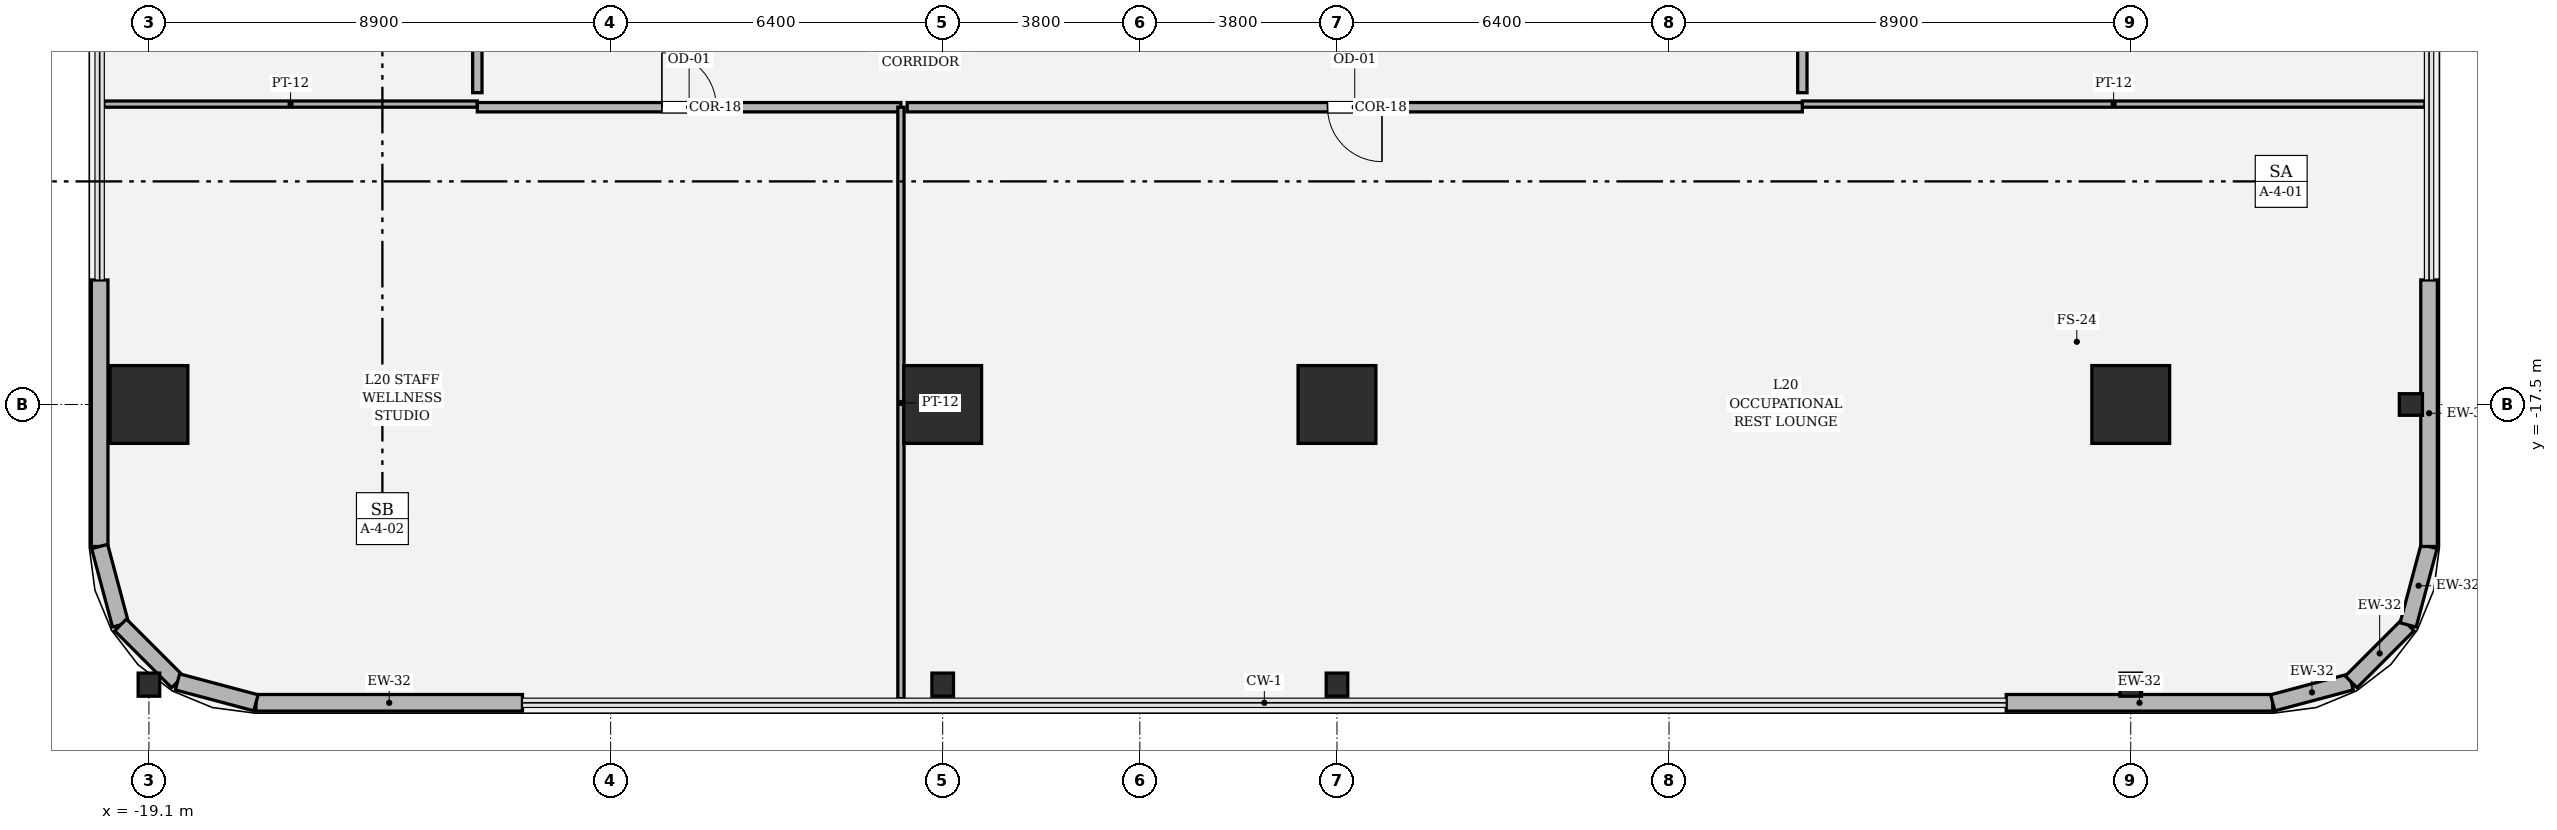
"""IFC4 building model, lengths in metres.
Left out: names, types, materials, properties, quantities, classifications, styles, units other than length and angle.
Written with IfcOpenShell. Run it as: python <this file> out.ifc"""

import sys

from ifc_helpers import new_model, si_unit, direction, frame, frame_2d, origin, origin_2d, place, context, subcontext, project, spatial, rectangle, hollow_rectangle, i_section, extrude, element, fill, save


model = new_model("IFC4")
c1 = context("Model", 3, precision=1e-05, world=origin(), true_north=direction((0.0, 1.0)))
c2 = subcontext(c1, "Body", "Model", "MODEL_VIEW")
j1 = project(units=[si_unit("LENGTHUNIT", "METRE"), si_unit("PLANEANGLEUNIT", "RADIAN")], contexts=[c1])
p1 = place(None, origin())
s1 = spatial("IfcSite", under=j1, at=p1, CompositionType="ELEMENT")
p2 = place(p1, origin())
s2 = spatial("IfcBuilding", under=s1, at=p2, CompositionType="ELEMENT")
p3 = place(p2, frame((0.0, 0.0, 88.95)))
s3 = spatial("IfcBuildingStorey", under=s2, at=p3, CompositionType="ELEMENT", Elevation=88.95)
for number, where, z_axis, x_axis in (
    (1, (-19.1, -17.5, 0.0), (0.0, 0.0, 1.0), (1.0, 0.0, 0.0)),
    (2, (-3.8, -17.5, 0.0), (0.0, 0.0, 1.0), (1.0, 0.0, 0.0)),
    (3, (3.8, -17.5, 0.0), (0.0, 0.0, 1.0), (1.0, 0.0, 0.0)),
    (4, (19.1, -17.5, 0.0), (0.0, 0.0, 1.0), (1.0, 0.0, 0.0)),
):
    element("IfcColumn", number, at=place(p3, frame(where, z_axis=z_axis, x_axis=x_axis)), inside=s3, PredefinedType="COLUMN", context=c2, shape_type="SweptSolid", body=[
        extrude(hollow_rectangle(XDim=1.5, YDim=1.5, WallThickness=0.045, at=origin_2d()), origin(), (0.0, 0.0, 1.0), 4.05),
    ])
for number, where, z_axis, x_axis in (
    (5, (-19.1, -22.9, 0.0), (0.0, 0.0, 1.0), (1.0, 0.0, 0.0)),
    (6, (-3.8, -22.9, 0.0), (0.0, 0.0, 1.0), (1.0, 0.0, 0.0)),
    (7, (3.8, -22.9, 0.0), (0.0, 0.0, 1.0), (1.0, 0.0, 0.0)),
    (8, (19.1, -22.9, 0.0), (0.0, 0.0, 1.0), (1.0, 0.0, 0.0)),
    (9, (24.5, -17.5, 0.0), (0.0, 0.0, 1.0), (0.0, 1.0, 0.0)),
):
    element("IfcColumn", number, at=place(p3, frame(where, z_axis=z_axis, x_axis=x_axis)), inside=s3, PredefinedType="COLUMN", context=c2, shape_type="SweptSolid", body=[
        extrude(i_section(OverallWidth=0.416, OverallDepth=0.446, WebThickness=0.039, FlangeThickness=0.062, FilletRadius=0.018, at=origin_2d()), origin(), (0.0, 0.0, 1.0), 4.048),
    ])
for number, where, z_axis, x_axis in (
    (10, (-17.037, -23.25, 0.0), (0.0, 0.0, 1.0), (1.0, 0.0, 0.0)),
    (11, (16.7, -23.25, 0.0), (0.0, 0.0, 1.0), (1.0, 0.0, 0.0)),
):
    element("IfcWall", number, at=place(p3, frame(where, z_axis=z_axis, x_axis=x_axis)), inside=s3, PredefinedType="SOLIDWALL", context=c2, shape_type="SweptSolid", body=[
        extrude(rectangle(XDim=5.137, YDim=0.32, at=frame_2d((2.568, 0.0))), origin(), (0.0, 0.0, 1.0), 3.77),
    ])
p4 = place(p3, frame((21.837, -23.25, 0.0), z_axis=(0.0, 0.0, 1.0), x_axis=(0.966224582397, 0.257701486942, 0.0)))
e12 = element("IfcWall", 12, at=p4, inside=s3, PredefinedType="SOLIDWALL", context=c2, shape_type="SweptSolid", body=[
    extrude(rectangle(XDim=1.565, YDim=0.32, at=frame_2d((0.783, 0.0))), origin(), (0.0, 0.0, 1.0), 3.77),
])
p5 = place(p3, frame((23.349, -22.847, 0.0), z_axis=(0.0, 0.0, 1.0), x_axis=(0.707028130747, 0.707185422879, 0.0)))
e13 = element("IfcWall", 13, at=p5, inside=s3, PredefinedType="SOLIDWALL", context=c2, shape_type="SweptSolid", body=[
    extrude(rectangle(XDim=1.552, YDim=0.32, at=frame_2d((0.776, 0.0))), origin(), (0.0, 0.0, 1.0), 3.77),
])
p6 = place(p3, frame((24.447, -21.749, 0.0), z_axis=(0.0, 0.0, 1.0), x_axis=(0.257847112249, 0.966185730957, 0.0)))
e14 = element("IfcWall", 14, at=p6, inside=s3, PredefinedType="SOLIDWALL", context=c2, shape_type="SweptSolid", body=[
    extrude(rectangle(XDim=1.565, YDim=0.32, at=frame_2d((0.783, 0.0))), origin(), (0.0, 0.0, 1.0), 3.77),
])
p7 = place(p3, frame((24.85, -20.237, 0.0), z_axis=(0.0, 0.0, 1.0), x_axis=(0.0, 1.0, 0.0)))
e15 = element("IfcWall", 15, at=p7, inside=s3, PredefinedType="SOLIDWALL", context=c2, shape_type="SweptSolid", body=[
    extrude(rectangle(XDim=5.137, YDim=0.32, at=frame_2d((2.568, 0.0))), origin(), (0.0, 0.0, 1.0), 2.444),
])
p8 = place(p3, frame((-20.05, -15.1, 0.0), z_axis=(0.0, 0.0, 1.0), x_axis=(0.0, -1.0, 0.0)))
e16 = element("IfcWall", 16, at=p8, inside=s3, PredefinedType="SOLIDWALL", context=c2, shape_type="SweptSolid", body=[
    extrude(rectangle(XDim=5.137, YDim=0.32, at=frame_2d((2.568, 0.0))), origin(), (0.0, 0.0, 1.0), 3.77),
])
p9 = place(p3, frame((-20.05, -20.237, 0.0), z_axis=(0.0, 0.0, 1.0), x_axis=(0.257847112249, -0.966185730957, 0.0)))
e17 = element("IfcWall", 17, at=p9, inside=s3, PredefinedType="SOLIDWALL", context=c2, shape_type="SweptSolid", body=[
    extrude(rectangle(XDim=1.565, YDim=0.32, at=frame_2d((0.783, 0.0))), origin(), (0.0, 0.0, 1.0), 3.77),
])
p10 = place(p3, frame((-19.646, -21.749, 0.0), z_axis=(0.0, 0.0, 1.0), x_axis=(0.707028130747, -0.707185422879, 0.0)))
e18 = element("IfcWall", 18, at=p10, inside=s3, PredefinedType="SOLIDWALL", context=c2, shape_type="SweptSolid", body=[
    extrude(rectangle(XDim=1.552, YDim=0.32, at=frame_2d((0.776, 0.0))), origin(), (0.0, 0.0, 1.0), 3.77),
])
p11 = place(p3, frame((-18.549, -22.847, 0.0), z_axis=(0.0, 0.0, 1.0), x_axis=(0.966224582397, -0.257701486942, 0.0)))
e19 = element("IfcWall", 19, at=p11, inside=s3, PredefinedType="SOLIDWALL", context=c2, shape_type="SweptSolid", body=[
    extrude(rectangle(XDim=1.565, YDim=0.32, at=frame_2d((0.783, 0.0))), origin(), (0.0, 0.0, 1.0), 3.77),
])
p12 = place(p3, frame((-19.97, -11.71, 0.0), z_axis=(0.0, 0.0, 1.0), x_axis=(1.0, 0.0, 0.0)))
e20 = element("IfcWall", 20, at=p12, inside=s3, PredefinedType="PARTITIONING", context=c2, shape_type="SweptSolid", body=[
    extrude(rectangle(XDim=7.2, YDim=0.12, at=frame_2d((3.6, 0.0))), origin(), (0.0, 0.0, 1.0), 2.444),
])
p13 = place(p3, frame((-12.77, -11.77, 0.0), z_axis=(0.0, 0.0, 1.0), x_axis=(1.0, 0.0, 0.0)))
e21 = element("IfcWall", 21, at=p13, inside=s3, PredefinedType="PARTITIONING", context=c2, shape_type="SweptSolid", body=[
    extrude(rectangle(XDim=8.165, YDim=0.18, at=frame_2d((4.083, 0.0))), origin(), (0.0, 0.0, 1.0), 2.444),
])
p14 = place(p13, frame((3.558, 0.0, 0.0)))
e22 = element("IfcOpeningElement", 22, at=p14, cuts=e21, PredefinedType="OPENING", context=c2, shape_type="SweptSolid", body=[
    extrude(rectangle(XDim=1.05, YDim=2.2, at=frame_2d((0.525, 1.1))), frame((0.0, 0.1, 0.0), z_axis=(0.0, -1.0, 0.0), x_axis=(1.0, 0.0, 0.0)), (0.0, 0.0, 1.0), 0.2),
])
p15 = place(p3, frame((-4.605, -11.77, 0.0), z_axis=(0.0, 0.0, 1.0), x_axis=(0.0, -1.0, 0.0)))
e23 = element("IfcWall", 23, at=p15, inside=s3, PredefinedType="PARTITIONING", context=c2, shape_type="SweptSolid", body=[
    extrude(rectangle(XDim=11.4, YDim=0.12, at=frame_2d((5.7, 0.0))), origin(), (0.0, 0.0, 1.0), 2.444),
])
p16 = place(p3, frame((12.77, -11.71, 0.0), z_axis=(0.0, 0.0, 1.0), x_axis=(1.0, 0.0, 0.0)))
e24 = element("IfcWall", 24, at=p16, inside=s3, PredefinedType="PARTITIONING", context=c2, shape_type="SweptSolid", body=[
    extrude(rectangle(XDim=12.0, YDim=0.12, at=frame_2d((6.0, 0.0))), origin(), (0.0, 0.0, 1.0), 2.444),
])
p17 = place(p3, frame((-4.485, -11.77, 0.0), z_axis=(0.0, 0.0, 1.0), x_axis=(1.0, 0.0, 0.0)))
e25 = element("IfcWall", 25, at=p17, inside=s3, PredefinedType="PARTITIONING", context=c2, shape_type="SweptSolid", body=[
    extrude(rectangle(XDim=17.255, YDim=0.18, at=frame_2d((8.627, 0.0))), origin(), (0.0, 0.0, 1.0), 2.444),
])
p18 = place(p17, frame((8.103, 0.0, 0.0)))
e26 = element("IfcOpeningElement", 26, at=p18, cuts=e25, PredefinedType="OPENING", context=c2, shape_type="SweptSolid", body=[
    extrude(rectangle(XDim=1.05, YDim=2.2, at=frame_2d((0.525, 1.1))), frame((0.0, 0.1, 0.0), z_axis=(0.0, -1.0, 0.0), x_axis=(1.0, 0.0, 0.0)), (0.0, 0.0, 1.0), 0.2),
])
p19 = place(p3, frame((12.77, -11.49, 0.0), z_axis=(0.0, 0.0, 1.0), x_axis=(0.0, 1.0, 0.0)))
e27 = element("IfcWall", 27, at=p19, inside=s3, PredefinedType="PARTITIONING", context=c2, shape_type="SweptSolid", body=[
    extrude(rectangle(XDim=8.196, YDim=0.18, at=frame_2d((4.098, 0.0))), origin(), (0.0, 0.0, 1.0), 2.444),
])
p20 = place(p19, frame((3.398, 0.0, 0.0)))
e28 = element("IfcOpeningElement", 28, at=p20, cuts=e27, PredefinedType="OPENING", context=c2, shape_type="SweptSolid", body=[
    extrude(rectangle(XDim=1.4, YDim=2.25, at=frame_2d((0.7, 1.125))), frame((0.0, 0.1, 0.0), z_axis=(0.0, -1.0, 0.0), x_axis=(1.0, 0.0, 0.0)), (0.0, 0.0, 1.0), 0.2),
])
p21 = place(p3, frame((-12.77, -1.2, 0.0), z_axis=(0.0, 0.0, 1.0), x_axis=(0.0, -1.0, 0.0)))
e29 = element("IfcWall", 29, at=p21, inside=s3, PredefinedType="PARTITIONING", context=c2, shape_type="SweptSolid", body=[
    extrude(rectangle(XDim=10.29, YDim=0.18, at=frame_2d((5.145, 0.0))), origin(), (0.0, 0.0, 1.0), 2.444),
])
p22 = place(p14, origin())
e30 = element("IfcDoor", 30, at=p22, inside=s3, OperationType="SINGLE_SWING_LEFT", PredefinedType="DOOR", context=c2, shape_type="SweptSolid", body=[
    extrude(rectangle(XDim=1.05, YDim=2.2, at=frame_2d((0.525, 1.1))), frame((0.0, 0.025, 0.0), z_axis=(0.0, -1.0, 0.0), x_axis=(1.0, 0.0, 0.0)), (0.0, 0.0, 1.0), 0.05),
])
fill(e22, e30)
p23 = place(p18, origin())
e31 = element("IfcDoor", 31, at=p23, inside=s3, OperationType="SINGLE_SWING_RIGHT", PredefinedType="DOOR", context=c2, shape_type="SweptSolid", body=[
    extrude(rectangle(XDim=1.05, YDim=2.2, at=frame_2d((0.525, 1.1))), frame((0.0, 0.025, 0.0), z_axis=(0.0, -1.0, 0.0), x_axis=(1.0, 0.0, 0.0)), (0.0, 0.0, 1.0), 0.05),
])
fill(e26, e31)
save(model, sys.argv[1])
